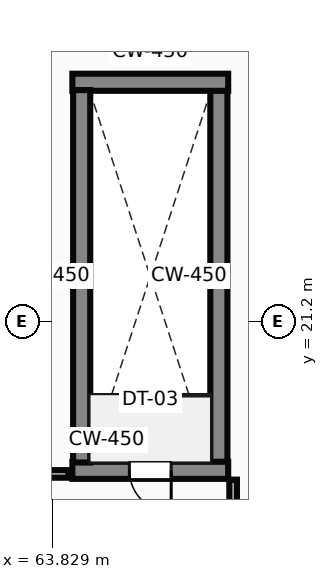
"""IFC4 building model, lengths in metres.
Left out: names, types, materials, properties, quantities, classifications, styles, units other than length and angle.
Written with IfcOpenShell. Run it as: python <this file> out.ifc"""

import sys

from ifc_helpers import new_model, si_unit, direction, frame, frame_2d, origin, place, context, subcontext, project, spatial, rectangle, extrude, source, transform, mapped, element, fill, save


model = new_model("IFC4")
c1 = context("Model", 3, precision=1e-05, world=origin(), true_north=direction((0.0, 1.0)))
c2 = subcontext(c1, "Body", "Model", "MODEL_VIEW")
j1 = project(units=[si_unit("LENGTHUNIT", "METRE"), si_unit("PLANEANGLEUNIT", "RADIAN")], contexts=[c1])
p1 = place(None, origin())
s1 = spatial("IfcSite", under=j1, at=p1, CompositionType="ELEMENT")
p2 = place(p1, origin())
s2 = spatial("IfcBuilding", under=s1, at=p2, CompositionType="ELEMENT")
p3 = place(p2, frame((0.0, 0.0, 26.0)))
s3 = spatial("IfcBuildingStorey", under=s2, at=p3, CompositionType="ELEMENT", Elevation=26.0)
m1 = source(origin(), c2, "Body", "SweptSolid", [
    extrude(rectangle(XDim=4.1, YDim=0.45, at=frame_2d((2.05, 0.0))), origin(), (0.0, 0.0, 1.0), 6.25),
])
p4 = place(p3, frame((64.35, 17.295, 0.0), z_axis=(0.0, 0.0, 1.0), x_axis=(1.0, 0.0, 0.0)))
e1 = element("IfcWall", 1, at=p4, inside=s3, PredefinedType="SHEAR", context=c2, shape_type="MappedRepresentation", body=[
    mapped(m1, transform((0.0, 0.0, 0.0))),
])
p5 = place(p4, frame((1.5, 0.0, 0.0)))
e2 = element("IfcOpeningElement", 2, at=p5, cuts=e1, PredefinedType="OPENING", context=c2, shape_type="SweptSolid", body=[
    extrude(rectangle(XDim=1.1, YDim=2.15, at=frame_2d((0.55, 1.075))), frame((0.0, 0.235, 0.0), z_axis=(0.0, -1.0, 0.0), x_axis=(1.0, 0.0, 0.0)), (0.0, 0.0, 1.0), 0.47),
])
m2 = source(origin(), c2, "Body", "SweptSolid", [
    extrude(rectangle(XDim=9.8, YDim=0.45, at=frame_2d((4.9, 0.0))), origin(), (0.0, 0.0, 1.0), 6.25),
])
for number, where, z_axis, x_axis in (
    (3, (64.595, 17.5, 0.0), (0.0, 0.0, 1.0), (0.0, 1.0, 0.0)),
    (4, (68.205, 17.5, 0.0), (0.0, 0.0, 1.0), (0.0, 1.0, 0.0)),
):
    element("IfcWall", number, at=place(p3, frame(where, z_axis=z_axis, x_axis=x_axis)), inside=s3, PredefinedType="SHEAR", context=c2, shape_type="MappedRepresentation", body=[
        mapped(m2, transform((0.0, 0.0, 0.0))),
    ])
p6 = place(p3, frame((64.35, 27.505, 0.0), z_axis=(0.0, 0.0, 1.0), x_axis=(1.0, 0.0, 0.0)))
e5 = element("IfcWall", 5, at=p6, inside=s3, PredefinedType="SHEAR", context=c2, shape_type="MappedRepresentation", body=[
    mapped(m1, transform((0.0, 0.0, 0.0))),
])
m3 = source(origin(), c2, "Body", "SweptSolid", [
    extrude(rectangle(XDim=3.05, YDim=0.2, at=frame_2d((1.525, 0.0))), origin(), (0.0, 0.0, 1.0), 6.25),
])
p7 = place(p3, frame((68.58, 14.0, 0.0), z_axis=(0.0, 0.0, 1.0), x_axis=(0.0, 1.0, 0.0)))
e6 = element("IfcWall", 6, at=p7, inside=s3, PredefinedType="PARTITIONING", context=c2, shape_type="MappedRepresentation", body=[
    mapped(m3, transform((0.0, 0.0, 0.0))),
])
m4 = source(origin(), c2, "Body", "SweptSolid", [
    extrude(rectangle(XDim=3.85, YDim=0.2, at=frame_2d((1.925, 0.0))), origin(), (0.0, 0.0, 1.0), 6.25),
])
p8 = place(p3, frame((60.4, 17.2, 0.0), z_axis=(0.0, 0.0, 1.0), x_axis=(1.0, 0.0, 0.0)))
e7 = element("IfcWall", 7, at=p8, inside=s3, PredefinedType="PARTITIONING", context=c2, shape_type="MappedRepresentation", body=[
    mapped(m4, transform((0.0, 0.0, 0.0))),
])
m5 = source(origin(), c2, "Body", "SweptSolid", [
    extrude(rectangle(XDim=1.1, YDim=2.15, at=frame_2d((0.55, 1.075))), frame((0.0, 0.025, 0.0), z_axis=(0.0, -1.0, 0.0), x_axis=(1.0, 0.0, 0.0)), (0.0, 0.0, 1.0), 0.05),
])
p9 = place(p5, origin())
e8 = element("IfcDoor", 8, at=p9, inside=s3, OperationType="SINGLE_SWING_RIGHT", PredefinedType="DOOR", context=c2, shape_type="MappedRepresentation", body=[
    mapped(m5, transform((0.0, 0.0, 0.0))),
])
fill(e2, e8)
save(model, sys.argv[1])
